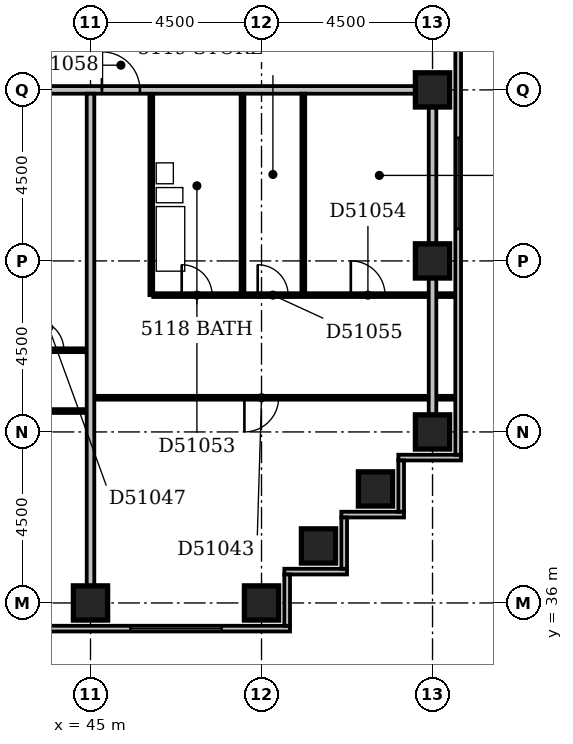
"""IFC4 building model, lengths in metres.
Left out: names, types, materials, properties, quantities, classifications, styles, units other than length and angle.
Written with IfcOpenShell. Run it as: python <this file> out.ifc"""

import sys

from ifc_helpers import new_model, si_unit, direction, frame, frame_2d, origin, origin_2d, place, context, subcontext, project, spatial, rectangle, extrude, element, fill, save


model = new_model("IFC4")
c1 = context("Model", 3, precision=1e-05, world=origin(), true_north=direction((0.0, 1.0)))
c2 = subcontext(c1, "Body", "Model", "MODEL_VIEW")
j1 = project(units=[si_unit("LENGTHUNIT", "METRE"), si_unit("PLANEANGLEUNIT", "RADIAN")], contexts=[c1])
p1 = place(None, origin())
s1 = spatial("IfcSite", under=j1, at=p1, CompositionType="ELEMENT")
p2 = place(p1, origin())
s2 = spatial("IfcBuilding", under=s1, at=p2, CompositionType="ELEMENT")
p3 = place(p2, frame((0.0, 0.0, 200.6)))
s3 = spatial("IfcBuildingStorey", under=s2, at=p3, CompositionType="ELEMENT", Elevation=200.6)
for number, where, z_axis, x_axis in (
    (1, (45.0, 36.0, -0.3), (0.0, 0.0, 1.0), (1.0, 0.0, 0.0)),
    (2, (49.5, 36.0, -0.3), (0.0, 0.0, 1.0), (1.0, 0.0, 0.0)),
    (3, (51.0, 37.5, -0.3), (0.0, 0.0, 1.0), (1.0, 0.0, 0.0)),
    (4, (52.5, 39.0, -0.3), (0.0, 0.0, 1.0), (1.0, 0.0, 0.0)),
    (5, (54.0, 40.5, -0.3), (0.0, 0.0, 1.0), (1.0, 0.0, 0.0)),
    (6, (54.0, 45.0, -0.3), (0.0, 0.0, 1.0), (1.0, 0.0, 0.0)),
    (7, (54.0, 49.5, -0.3), (0.0, 0.0, 1.0), (1.0, 0.0, 0.0)),
):
    element("IfcColumn", number, at=place(p3, frame(where, z_axis=z_axis, x_axis=x_axis)), inside=s3, PredefinedType="COLUMN", context=c2, shape_type="SweptSolid", body=[
        extrude(rectangle(XDim=0.9, YDim=0.9, at=origin_2d()), origin(), (0.0, 0.0, 1.0), 3.6),
    ])
p4 = place(p3, frame((23.1, 35.325, 0.0), z_axis=(0.0, 0.0, 1.0), x_axis=(1.0, 0.0, 0.0)))
e8 = element("IfcWall", 8, at=p4, inside=s3, PredefinedType="STANDARD", context=c2, shape_type="SweptSolid", body=[
    extrude(rectangle(XDim=27.15, YDim=0.15, at=frame_2d((13.575, 0.0))), origin(), (0.0, 0.0, 1.0), 2.7),
])
p5 = place(p4, frame((0.45, 0.0, 0.6)))
e9 = element("IfcOpeningElement", 9, at=p5, cuts=e8, PredefinedType="OPENING", context=c2, shape_type="SweptSolid", body=[
    extrude(rectangle(XDim=2.4, YDim=1.8, at=frame_2d((1.2, 0.9))), frame((0.0, 0.087, 0.0), z_axis=(0.0, -1.0, 0.0), x_axis=(1.0, 0.0, 0.0)), (0.0, 0.0, 1.0), 0.174),
])
p6 = place(p4, frame((4.95, 0.0, 0.6)))
e10 = element("IfcOpeningElement", 10, at=p6, cuts=e8, PredefinedType="OPENING", context=c2, shape_type="SweptSolid", body=[
    extrude(rectangle(XDim=2.4, YDim=1.8, at=frame_2d((1.2, 0.9))), frame((0.0, 0.087, 0.0), z_axis=(0.0, -1.0, 0.0), x_axis=(1.0, 0.0, 0.0)), (0.0, 0.0, 1.0), 0.174),
])
p7 = place(p4, frame((9.45, 0.0, 0.6)))
e11 = element("IfcOpeningElement", 11, at=p7, cuts=e8, PredefinedType="OPENING", context=c2, shape_type="SweptSolid", body=[
    extrude(rectangle(XDim=2.4, YDim=1.8, at=frame_2d((1.2, 0.9))), frame((0.0, 0.087, 0.0), z_axis=(0.0, -1.0, 0.0), x_axis=(1.0, 0.0, 0.0)), (0.0, 0.0, 1.0), 0.174),
])
p8 = place(p4, frame((13.95, 0.0, 0.6)))
e12 = element("IfcOpeningElement", 12, at=p8, cuts=e8, PredefinedType="OPENING", context=c2, shape_type="SweptSolid", body=[
    extrude(rectangle(XDim=2.4, YDim=1.8, at=frame_2d((1.2, 0.9))), frame((0.0, 0.087, 0.0), z_axis=(0.0, -1.0, 0.0), x_axis=(1.0, 0.0, 0.0)), (0.0, 0.0, 1.0), 0.174),
])
p9 = place(p4, frame((18.45, 0.0, 0.6)))
e13 = element("IfcOpeningElement", 13, at=p9, cuts=e8, PredefinedType="OPENING", context=c2, shape_type="SweptSolid", body=[
    extrude(rectangle(XDim=2.4, YDim=1.8, at=frame_2d((1.2, 0.9))), frame((0.0, 0.087, 0.0), z_axis=(0.0, -1.0, 0.0), x_axis=(1.0, 0.0, 0.0)), (0.0, 0.0, 1.0), 0.174),
])
p10 = place(p4, frame((22.95, 0.0, 0.6)))
e14 = element("IfcOpeningElement", 14, at=p10, cuts=e8, PredefinedType="OPENING", context=c2, shape_type="SweptSolid", body=[
    extrude(rectangle(XDim=2.4, YDim=1.8, at=frame_2d((1.2, 0.9))), frame((0.0, 0.087, 0.0), z_axis=(0.0, -1.0, 0.0), x_axis=(1.0, 0.0, 0.0)), (0.0, 0.0, 1.0), 0.174),
])
p11 = place(p3, frame((50.175, 35.4, 0.0), z_axis=(0.0, 0.0, 1.0), x_axis=(0.0, 1.0, 0.0)))
e15 = element("IfcWall", 15, at=p11, inside=s3, PredefinedType="STANDARD", context=c2, shape_type="SweptSolid", body=[
    extrude(rectangle(XDim=1.35, YDim=0.15, at=frame_2d((0.675, 0.0))), origin(), (0.0, 0.0, 1.0), 2.7),
])
p12 = place(p3, frame((50.1, 36.825, 0.0), z_axis=(0.0, 0.0, 1.0), x_axis=(1.0, 0.0, 0.0)))
e16 = element("IfcWall", 16, at=p12, inside=s3, PredefinedType="STANDARD", context=c2, shape_type="SweptSolid", body=[
    extrude(rectangle(XDim=1.65, YDim=0.15, at=frame_2d((0.825, 0.0))), origin(), (0.0, 0.0, 1.0), 2.7),
])
p13 = place(p3, frame((51.675, 36.9, 0.0), z_axis=(0.0, 0.0, 1.0), x_axis=(0.0, 1.0, 0.0)))
e17 = element("IfcWall", 17, at=p13, inside=s3, PredefinedType="STANDARD", context=c2, shape_type="SweptSolid", body=[
    extrude(rectangle(XDim=1.35, YDim=0.15, at=frame_2d((0.675, 0.0))), origin(), (0.0, 0.0, 1.0), 2.7),
])
p14 = place(p3, frame((51.6, 38.325, 0.0), z_axis=(0.0, 0.0, 1.0), x_axis=(1.0, 0.0, 0.0)))
e18 = element("IfcWall", 18, at=p14, inside=s3, PredefinedType="STANDARD", context=c2, shape_type="SweptSolid", body=[
    extrude(rectangle(XDim=1.65, YDim=0.15, at=frame_2d((0.825, 0.0))), origin(), (0.0, 0.0, 1.0), 2.7),
])
p15 = place(p3, frame((53.175, 38.4, 0.0), z_axis=(0.0, 0.0, 1.0), x_axis=(0.0, 1.0, 0.0)))
e19 = element("IfcWall", 19, at=p15, inside=s3, PredefinedType="STANDARD", context=c2, shape_type="SweptSolid", body=[
    extrude(rectangle(XDim=1.35, YDim=0.15, at=frame_2d((0.675, 0.0))), origin(), (0.0, 0.0, 1.0), 2.7),
])
p16 = place(p3, frame((53.1, 39.825, 0.0), z_axis=(0.0, 0.0, 1.0), x_axis=(1.0, 0.0, 0.0)))
e20 = element("IfcWall", 20, at=p16, inside=s3, PredefinedType="STANDARD", context=c2, shape_type="SweptSolid", body=[
    extrude(rectangle(XDim=1.65, YDim=0.15, at=frame_2d((0.825, 0.0))), origin(), (0.0, 0.0, 1.0), 2.7),
])
p17 = place(p3, frame((54.675, 39.9, 0.0), z_axis=(0.0, 0.0, 1.0), x_axis=(0.0, 1.0, 0.0)))
e21 = element("IfcWall", 21, at=p17, inside=s3, PredefinedType="STANDARD", context=c2, shape_type="SweptSolid", body=[
    extrude(rectangle(XDim=14.85, YDim=0.15, at=frame_2d((7.425, 0.0))), origin(), (0.0, 0.0, 1.0), 2.7),
])
p18 = place(p17, frame((5.939, 0.0, 0.6)))
e22 = element("IfcOpeningElement", 22, at=p18, cuts=e21, PredefinedType="OPENING", context=c2, shape_type="SweptSolid", body=[
    extrude(rectangle(XDim=2.4, YDim=1.8, at=frame_2d((1.2, 0.9))), frame((0.0, 0.087, 0.0), z_axis=(0.0, -1.0, 0.0), x_axis=(1.0, 0.0, 0.0)), (0.0, 0.0, 1.0), 0.174),
])
p19 = place(p3, frame((45.0, 36.45, 0.0), z_axis=(0.0, 0.0, 1.0), x_axis=(0.0, 1.0, 0.0)))
e23 = element("IfcWall", 23, at=p19, inside=s3, PredefinedType="PARTITIONING", context=c2, shape_type="SweptSolid", body=[
    extrude(rectangle(XDim=12.95, YDim=0.2, at=frame_2d((6.475, 0.0))), origin(), (0.0, 0.0, 1.0), 2.6),
])
p20 = place(p3, frame((54.0, 40.95, 0.0), z_axis=(0.0, 0.0, 1.0), x_axis=(0.0, 1.0, 0.0)))
e24 = element("IfcWall", 24, at=p20, inside=s3, PredefinedType="PARTITIONING", context=c2, shape_type="SweptSolid", body=[
    extrude(rectangle(XDim=8.1, YDim=0.2, at=frame_2d((4.05, 0.0))), origin(), (0.0, 0.0, 1.0), 2.7),
])
p21 = place(p3, frame((22.6, 41.05, 0.0), z_axis=(0.0, 0.0, 1.0), x_axis=(1.0, 0.0, 0.0)))
e25 = element("IfcWall", 25, at=p21, inside=s3, PredefinedType="PARTITIONING", context=c2, shape_type="SweptSolid", body=[
    extrude(rectangle(XDim=22.3, YDim=0.1, at=frame_2d((11.15, 0.0))), origin(), (0.0, 0.0, 1.0), 3.3),
])
p22 = place(p21, frame((3.9, 0.0, 0.0)))
e26 = element("IfcOpeningElement", 26, at=p22, cuts=e25, PredefinedType="OPENING", context=c2, shape_type="SweptSolid", body=[
    extrude(rectangle(XDim=0.9, YDim=2.1, at=frame_2d((0.45, 1.05))), frame((0.0, 0.062, 0.0), z_axis=(0.0, -1.0, 0.0), x_axis=(1.0, 0.0, 0.0)), (0.0, 0.0, 1.0), 0.124),
])
p23 = place(p21, frame((9.55, 0.0, 0.0)))
e27 = element("IfcOpeningElement", 27, at=p23, cuts=e25, PredefinedType="OPENING", context=c2, shape_type="SweptSolid", body=[
    extrude(rectangle(XDim=0.9, YDim=2.1, at=frame_2d((0.45, 1.05))), frame((0.0, 0.062, 0.0), z_axis=(0.0, -1.0, 0.0), x_axis=(1.0, 0.0, 0.0)), (0.0, 0.0, 1.0), 0.124),
])
p24 = place(p21, frame((16.35, 0.0, 0.0)))
e28 = element("IfcOpeningElement", 28, at=p24, cuts=e25, PredefinedType="OPENING", context=c2, shape_type="SweptSolid", body=[
    extrude(rectangle(XDim=0.9, YDim=2.1, at=frame_2d((0.45, 1.05))), frame((0.0, 0.062, 0.0), z_axis=(0.0, -1.0, 0.0), x_axis=(1.0, 0.0, 0.0)), (0.0, 0.0, 1.0), 0.124),
])
p25 = place(p21, frame((19.7, 0.0, 0.0)))
e29 = element("IfcOpeningElement", 29, at=p25, cuts=e25, PredefinedType="OPENING", context=c2, shape_type="SweptSolid", body=[
    extrude(rectangle(XDim=0.9, YDim=2.1, at=frame_2d((0.45, 1.05))), frame((0.0, 0.062, 0.0), z_axis=(0.0, -1.0, 0.0), x_axis=(1.0, 0.0, 0.0)), (0.0, 0.0, 1.0), 0.124),
])
p26 = place(p3, frame((45.1, 41.4, 0.0), z_axis=(0.0, 0.0, 1.0), x_axis=(1.0, 0.0, 0.0)))
e30 = element("IfcWall", 30, at=p26, inside=s3, PredefinedType="PARTITIONING", context=c2, shape_type="SweptSolid", body=[
    extrude(rectangle(XDim=9.5, YDim=0.1, at=frame_2d((4.75, 0.0))), origin(), (0.0, 0.0, 1.0), 3.3),
])
p27 = place(p26, frame((3.95, 0.0, 0.0)))
e31 = element("IfcOpeningElement", 31, at=p27, cuts=e30, PredefinedType="OPENING", context=c2, shape_type="SweptSolid", body=[
    extrude(rectangle(XDim=0.9, YDim=2.1, at=frame_2d((0.45, 1.05))), frame((0.0, 0.062, 0.0), z_axis=(0.0, -1.0, 0.0), x_axis=(1.0, 0.0, 0.0)), (0.0, 0.0, 1.0), 0.124),
])
p28 = place(p3, frame((24.15, 42.65, 0.0), z_axis=(0.0, 0.0, 1.0), x_axis=(1.0, 0.0, 0.0)))
e32 = element("IfcWall", 32, at=p28, inside=s3, PredefinedType="PARTITIONING", context=c2, shape_type="SweptSolid", body=[
    extrude(rectangle(XDim=20.75, YDim=0.1, at=frame_2d((10.375, 0.0))), origin(), (0.0, 0.0, 1.0), 3.3),
])
p29 = place(p28, frame((5.95, 0.0, 0.0)))
e33 = element("IfcOpeningElement", 33, at=p29, cuts=e32, PredefinedType="OPENING", context=c2, shape_type="SweptSolid", body=[
    extrude(rectangle(XDim=0.8, YDim=2.1, at=frame_2d((0.4, 1.05))), frame((0.0, 0.062, 0.0), z_axis=(0.0, -1.0, 0.0), x_axis=(1.0, 0.0, 0.0)), (0.0, 0.0, 1.0), 0.124),
])
p30 = place(p28, frame((11.35, 0.0, 0.0)))
e34 = element("IfcOpeningElement", 34, at=p30, cuts=e32, PredefinedType="OPENING", context=c2, shape_type="SweptSolid", body=[
    extrude(rectangle(XDim=0.8, YDim=2.1, at=frame_2d((0.4, 1.05))), frame((0.0, 0.062, 0.0), z_axis=(0.0, -1.0, 0.0), x_axis=(1.0, 0.0, 0.0)), (0.0, 0.0, 1.0), 0.124),
])
p31 = place(p28, frame((2.1, 0.0, 0.0)))
e35 = element("IfcOpeningElement", 35, at=p31, cuts=e32, PredefinedType="OPENING", context=c2, shape_type="SweptSolid", body=[
    extrude(rectangle(XDim=0.9, YDim=2.1, at=frame_2d((0.45, 1.05))), frame((0.0, 0.062, 0.0), z_axis=(0.0, -1.0, 0.0), x_axis=(1.0, 0.0, 0.0)), (0.0, 0.0, 1.0), 0.124),
])
p32 = place(p28, frame((19.35, 0.0, 0.0)))
e36 = element("IfcOpeningElement", 36, at=p32, cuts=e32, PredefinedType="OPENING", context=c2, shape_type="SweptSolid", body=[
    extrude(rectangle(XDim=0.8, YDim=2.1, at=frame_2d((0.4, 1.05))), frame((0.0, 0.062, 0.0), z_axis=(0.0, -1.0, 0.0), x_axis=(1.0, 0.0, 0.0)), (0.0, 0.0, 1.0), 0.124),
])
p33 = place(p28, frame((15.45, 0.0, 0.0)))
e37 = element("IfcOpeningElement", 37, at=p33, cuts=e32, PredefinedType="OPENING", context=c2, shape_type="SweptSolid", body=[
    extrude(rectangle(XDim=0.8, YDim=2.1, at=frame_2d((0.4, 1.05))), frame((0.0, 0.062, 0.0), z_axis=(0.0, -1.0, 0.0), x_axis=(1.0, 0.0, 0.0)), (0.0, 0.0, 1.0), 0.124),
])
p34 = place(p28, frame((9.45, 0.0, 0.0)))
e38 = element("IfcOpeningElement", 38, at=p34, cuts=e32, PredefinedType="OPENING", context=c2, shape_type="SweptSolid", body=[
    extrude(rectangle(XDim=0.8, YDim=2.1, at=frame_2d((0.4, 1.05))), frame((0.0, 0.062, 0.0), z_axis=(0.0, -1.0, 0.0), x_axis=(1.0, 0.0, 0.0)), (0.0, 0.0, 1.0), 0.124),
])
p35 = place(p28, frame((13.45, 0.0, 0.0)))
e39 = element("IfcOpeningElement", 39, at=p35, cuts=e32, PredefinedType="OPENING", context=c2, shape_type="SweptSolid", body=[
    extrude(rectangle(XDim=0.8, YDim=2.1, at=frame_2d((0.4, 1.05))), frame((0.0, 0.062, 0.0), z_axis=(0.0, -1.0, 0.0), x_axis=(1.0, 0.0, 0.0)), (0.0, 0.0, 1.0), 0.124),
])
p36 = place(p28, frame((17.35, 0.0, 0.0)))
e40 = element("IfcOpeningElement", 40, at=p36, cuts=e32, PredefinedType="OPENING", context=c2, shape_type="SweptSolid", body=[
    extrude(rectangle(XDim=0.8, YDim=2.1, at=frame_2d((0.4, 1.05))), frame((0.0, 0.062, 0.0), z_axis=(0.0, -1.0, 0.0), x_axis=(1.0, 0.0, 0.0)), (0.0, 0.0, 1.0), 0.124),
])
p37 = place(p28, frame((7.9, 0.0, 0.0)))
e41 = element("IfcOpeningElement", 41, at=p37, cuts=e32, PredefinedType="OPENING", context=c2, shape_type="SweptSolid", body=[
    extrude(rectangle(XDim=0.8, YDim=2.1, at=frame_2d((0.4, 1.05))), frame((0.0, 0.062, 0.0), z_axis=(0.0, -1.0, 0.0), x_axis=(1.0, 0.0, 0.0)), (0.0, 0.0, 1.0), 0.124),
])
p38 = place(p3, frame((46.6, 44.1, 0.0), z_axis=(0.0, 0.0, 1.0), x_axis=(0.0, 1.0, 0.0)))
e42 = element("IfcWall", 42, at=p38, inside=s3, PredefinedType="PLUMBINGWALL", context=c2, shape_type="SweptSolid", body=[
    extrude(rectangle(XDim=5.3, YDim=0.1, at=frame_2d((2.65, 0.0))), origin(), (0.0, 0.0, 1.0), 3.3),
])
p39 = place(p3, frame((46.65, 44.1, 0.0), z_axis=(0.0, 0.0, 1.0), x_axis=(1.0, 0.0, 0.0)))
e43 = element("IfcWall", 43, at=p39, inside=s3, PredefinedType="PARTITIONING", context=c2, shape_type="SweptSolid", body=[
    extrude(rectangle(XDim=7.95, YDim=0.1, at=frame_2d((3.975, 0.0))), origin(), (0.0, 0.0, 1.0), 3.3),
])
p40 = place(p39, frame((0.75, 0.0, 0.0)))
e44 = element("IfcOpeningElement", 44, at=p40, cuts=e43, PredefinedType="OPENING", context=c2, shape_type="SweptSolid", body=[
    extrude(rectangle(XDim=0.8, YDim=2.1, at=frame_2d((0.4, 1.05))), frame((0.0, 0.062, 0.0), z_axis=(0.0, -1.0, 0.0), x_axis=(1.0, 0.0, 0.0)), (0.0, 0.0, 1.0), 0.124),
])
p41 = place(p39, frame((5.2, 0.0, 0.0)))
e45 = element("IfcOpeningElement", 45, at=p41, cuts=e43, PredefinedType="OPENING", context=c2, shape_type="SweptSolid", body=[
    extrude(rectangle(XDim=0.9, YDim=2.1, at=frame_2d((0.45, 1.05))), frame((0.0, 0.062, 0.0), z_axis=(0.0, -1.0, 0.0), x_axis=(1.0, 0.0, 0.0)), (0.0, 0.0, 1.0), 0.124),
])
p42 = place(p39, frame((2.75, 0.0, 0.0)))
e46 = element("IfcOpeningElement", 46, at=p42, cuts=e43, PredefinedType="OPENING", context=c2, shape_type="SweptSolid", body=[
    extrude(rectangle(XDim=0.8, YDim=2.1, at=frame_2d((0.4, 1.05))), frame((0.0, 0.062, 0.0), z_axis=(0.0, -1.0, 0.0), x_axis=(1.0, 0.0, 0.0)), (0.0, 0.0, 1.0), 0.124),
])
p43 = place(p3, frame((49.0, 44.15, 0.0), z_axis=(0.0, 0.0, 1.0), x_axis=(0.0, 1.0, 0.0)))
e47 = element("IfcWall", 47, at=p43, inside=s3, PredefinedType="PLUMBINGWALL", context=c2, shape_type="SweptSolid", body=[
    extrude(rectangle(XDim=5.25, YDim=0.1, at=frame_2d((2.625, 0.0))), origin(), (0.0, 0.0, 1.0), 3.3),
])
p44 = place(p3, frame((50.6, 44.15, 0.0), z_axis=(0.0, 0.0, 1.0), x_axis=(0.0, 1.0, 0.0)))
e48 = element("IfcWall", 48, at=p44, inside=s3, PredefinedType="PARTITIONING", context=c2, shape_type="SweptSolid", body=[
    extrude(rectangle(XDim=5.25, YDim=0.1, at=frame_2d((2.625, 0.0))), origin(), (0.0, 0.0, 1.0), 3.3),
])
p45 = place(p3, frame((22.6, 49.5, 0.0), z_axis=(0.0, 0.0, 1.0), x_axis=(1.0, 0.0, 0.0)))
e49 = element("IfcWall", 49, at=p45, inside=s3, PredefinedType="PARTITIONING", context=c2, shape_type="SweptSolid", body=[
    extrude(rectangle(XDim=30.95, YDim=0.2, at=frame_2d((15.475, 0.0))), origin(), (0.0, 0.0, 1.0), 3.3),
])
p46 = place(p45, frame((0.2, 0.0, 0.0)))
e50 = element("IfcOpeningElement", 50, at=p46, cuts=e49, PredefinedType="OPENING", context=c2, shape_type="SweptSolid", body=[
    extrude(rectangle(XDim=1.0, YDim=2.1, at=frame_2d((0.5, 1.05))), frame((0.0, 0.112, 0.0), z_axis=(0.0, -1.0, 0.0), x_axis=(1.0, 0.0, 0.0)), (0.0, 0.0, 1.0), 0.224),
])
p47 = place(p45, frame((22.7, 0.0, 0.0)))
e51 = element("IfcOpeningElement", 51, at=p47, cuts=e49, PredefinedType="OPENING", context=c2, shape_type="SweptSolid", body=[
    extrude(rectangle(XDim=1.0, YDim=2.1, at=frame_2d((0.5, 1.05))), frame((0.0, 0.112, 0.0), z_axis=(0.0, -1.0, 0.0), x_axis=(1.0, 0.0, 0.0)), (0.0, 0.0, 1.0), 0.224),
])
p48 = place(p10, origin())
e52 = element("IfcWindow", 52, at=p48, inside=s3, PartitioningType="SINGLE_PANEL", PredefinedType="WINDOW", context=c2, shape_type="SweptSolid", body=[
    extrude(rectangle(XDim=2.4, YDim=1.8, at=frame_2d((1.2, 0.9))), frame((0.0, 0.03, 0.0), z_axis=(0.0, -1.0, 0.0), x_axis=(1.0, 0.0, 0.0)), (0.0, 0.0, 1.0), 0.06),
])
fill(e14, e52)
p49 = place(p18, origin())
e53 = element("IfcWindow", 53, at=p49, inside=s3, PartitioningType="SINGLE_PANEL", PredefinedType="WINDOW", context=c2, shape_type="SweptSolid", body=[
    extrude(rectangle(XDim=2.4, YDim=1.8, at=frame_2d((1.2, 0.9))), frame((0.0, 0.03, 0.0), z_axis=(0.0, -1.0, 0.0), x_axis=(1.0, 0.0, 0.0)), (0.0, 0.0, 1.0), 0.06),
])
fill(e22, e53)
p50 = place(p27, frame((0.9, 0.0, 0.0), z_axis=(0.0, 0.0, 1.0), x_axis=(-1.0, 0.0, 0.0)))
e54 = element("IfcDoor", 54, at=p50, inside=s3, OperationType="SINGLE_SWING_RIGHT", PredefinedType="DOOR", context=c2, shape_type="SweptSolid", body=[
    extrude(rectangle(XDim=0.9, YDim=2.1, at=frame_2d((0.45, 1.05))), frame((0.0, 0.025, 0.0), z_axis=(0.0, -1.0, 0.0), x_axis=(1.0, 0.0, 0.0)), (0.0, 0.0, 1.0), 0.05),
])
fill(e31, e54)
p51 = place(p32, origin())
e55 = element("IfcDoor", 55, at=p51, inside=s3, OperationType="SINGLE_SWING_LEFT", PredefinedType="DOOR", context=c2, shape_type="SweptSolid", body=[
    extrude(rectangle(XDim=0.8, YDim=2.1, at=frame_2d((0.4, 1.05))), frame((0.0, 0.025, 0.0), z_axis=(0.0, -1.0, 0.0), x_axis=(1.0, 0.0, 0.0)), (0.0, 0.0, 1.0), 0.05),
])
fill(e36, e55)
p52 = place(p40, origin())
e56 = element("IfcDoor", 56, at=p52, inside=s3, OperationType="SINGLE_SWING_LEFT", PredefinedType="DOOR", context=c2, shape_type="SweptSolid", body=[
    extrude(rectangle(XDim=0.8, YDim=2.1, at=frame_2d((0.4, 1.05))), frame((0.0, 0.025, 0.0), z_axis=(0.0, -1.0, 0.0), x_axis=(1.0, 0.0, 0.0)), (0.0, 0.0, 1.0), 0.05),
])
fill(e44, e56)
p53 = place(p41, origin())
e57 = element("IfcDoor", 57, at=p53, inside=s3, OperationType="SINGLE_SWING_LEFT", PredefinedType="DOOR", context=c2, shape_type="SweptSolid", body=[
    extrude(rectangle(XDim=0.9, YDim=2.1, at=frame_2d((0.45, 1.05))), frame((0.0, 0.025, 0.0), z_axis=(0.0, -1.0, 0.0), x_axis=(1.0, 0.0, 0.0)), (0.0, 0.0, 1.0), 0.05),
])
fill(e45, e57)
p54 = place(p42, origin())
e58 = element("IfcDoor", 58, at=p54, inside=s3, OperationType="SINGLE_SWING_LEFT", PredefinedType="DOOR", context=c2, shape_type="SweptSolid", body=[
    extrude(rectangle(XDim=0.8, YDim=2.1, at=frame_2d((0.4, 1.05))), frame((0.0, 0.025, 0.0), z_axis=(0.0, -1.0, 0.0), x_axis=(1.0, 0.0, 0.0)), (0.0, 0.0, 1.0), 0.05),
])
fill(e46, e58)
p55 = place(p47, origin())
e59 = element("IfcDoor", 59, at=p55, inside=s3, OperationType="SINGLE_SWING_LEFT", PredefinedType="DOOR", context=c2, shape_type="SweptSolid", body=[
    extrude(rectangle(XDim=1.0, YDim=2.1, at=frame_2d((0.5, 1.05))), frame((0.0, 0.025, 0.0), z_axis=(0.0, -1.0, 0.0), x_axis=(1.0, 0.0, 0.0)), (0.0, 0.0, 1.0), 0.05),
])
fill(e51, e59)
save(model, sys.argv[1])
